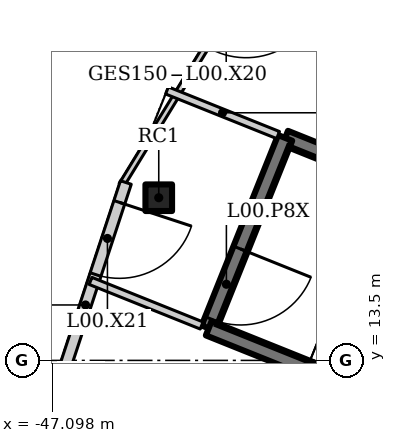
"""IFC4 building model, lengths in metres.
Left out: names, types, materials, properties, quantities, classifications, styles, units other than length and angle.
Written with IfcOpenShell. Run it as: python <this file> out.ifc"""

import sys

from ifc_helpers import new_model, si_unit, direction, frame, frame_2d, origin, origin_2d, place, context, subcontext, project, spatial, rectangle, hollow_rectangle, extrude, element, fill, save


model = new_model("IFC4")
c1 = context("Model", 3, precision=1e-05, world=origin(), true_north=direction((0.0, 1.0)))
c2 = subcontext(c1, "Body", "Model", "MODEL_VIEW")
j1 = project(units=[si_unit("LENGTHUNIT", "METRE"), si_unit("PLANEANGLEUNIT", "RADIAN")], contexts=[c1])
p1 = place(None, origin())
s1 = spatial("IfcSite", under=j1, at=p1, CompositionType="ELEMENT")
p2 = place(p1, origin())
s2 = spatial("IfcBuilding", under=s1, at=p2, CompositionType="ELEMENT")
p3 = place(p2, origin())
s3 = spatial("IfcBuildingStorey", under=s2, at=p3, CompositionType="ELEMENT", Elevation=0.0)
p4 = place(p3, frame((-44.292, 17.781, 0.0), z_axis=(0.0, 0.0, 1.0), x_axis=(1.0, 0.0, 0.0)))
e1 = element("IfcColumn", 1, at=p4, inside=s3, PredefinedType="COLUMN", context=c2, shape_type="SweptSolid", body=[
    extrude(hollow_rectangle(XDim=0.7, YDim=0.7, WallThickness=0.04, at=origin_2d()), origin(), (0.0, 0.0, 1.0), 6.5),
])
p5 = place(p3, frame((-41.734, 23.892, 0.0), z_axis=(0.0, 0.0, 1.0), x_axis=(-0.522237351002, -0.852800181296, 0.0)))
e2 = element("IfcWall", 2, at=p5, inside=s3, PredefinedType="ELEMENTEDWALL", context=c2, shape_type="SweptSolid", body=[
    extrude(rectangle(XDim=6.771, YDim=0.15, at=frame_2d((3.386, 0.0))), origin(), (0.0, 0.0, 1.0), 6.3),
])
p6 = place(p5, frame((0.5, 0.0, 0.0)))
e3 = element("IfcOpeningElement", 3, at=p6, cuts=e2, PredefinedType="OPENING", context=c2, shape_type="SweptSolid", body=[
    extrude(rectangle(XDim=2.0, YDim=2.4, at=frame_2d((1.0, 1.2))), frame((0.0, 0.085, 0.0), z_axis=(0.0, -1.0, 0.0), x_axis=(1.0, 0.0, 0.0)), (0.0, 0.0, 1.0), 0.17),
])
p7 = place(p3, frame((-45.158, 18.182, 0.0), z_axis=(0.0, 0.0, 1.0), x_axis=(-0.31263149373, -0.94987449125, 0.0)))
e4 = element("IfcWall", 4, at=p7, inside=s3, PredefinedType="SOLIDWALL", context=c2, shape_type="SweptSolid", body=[
    extrude(rectangle(XDim=6.786, YDim=0.3, at=frame_2d((3.393, 0.0))), origin(), (0.0, 0.0, 1.0), 6.3),
])
p8 = place(p7, frame((0.55, 0.0, 0.0)))
e5 = element("IfcOpeningElement", 5, at=p8, cuts=e4, PredefinedType="OPENING", context=c2, shape_type="SweptSolid", body=[
    extrude(rectangle(XDim=2.0, YDim=2.1, at=frame_2d((1.0, 1.05))), frame((0.0, 0.16, 0.0), z_axis=(0.0, -1.0, 0.0), x_axis=(1.0, 0.0, 0.0)), (0.0, 0.0, 1.0), 0.32),
])
p9 = place(p3, frame((-41.152, 19.43, 0.0), z_axis=(0.0, 0.0, 1.0), x_axis=(-0.928037743531, 0.372486169652, 0.0)))
e6 = element("IfcWall", 6, at=p9, inside=s3, PredefinedType="SOLIDWALL", context=c2, shape_type="SweptSolid", body=[
    extrude(rectangle(XDim=3.15, YDim=0.2, at=frame_2d((1.575, 0.0))), origin(), (0.0, 0.0, 1.0), 6.3),
])
p10 = place(p3, frame((-43.164, 14.418, 0.0), z_axis=(0.0, 0.0, 1.0), x_axis=(-0.928010950087, 0.372552917744, 0.0)))
e7 = element("IfcWall", 7, at=p10, inside=s3, PredefinedType="SOLIDWALL", context=c2, shape_type="SweptSolid", body=[
    extrude(rectangle(XDim=3.15, YDim=0.2, at=frame_2d((1.575, 0.0))), origin(), (0.0, 0.0, 1.0), 6.3),
])
p11 = place(p3, frame((-32.8, 16.077, 0.0), z_axis=(0.0, 0.0, 1.0), x_axis=(-0.92801678004, 0.372538395288, 0.0)))
e8 = element("IfcWall", 8, at=p11, inside=s3, PredefinedType="SHEAR", context=c2, shape_type="SweptSolid", body=[
    extrude(rectangle(XDim=8.8, YDim=0.4, at=frame_2d((4.4, 0.0))), origin(), (0.0, 0.0, 1.0), 6.5),
])
p12 = place(p3, frame((-40.967, 19.355, 0.0), z_axis=(0.0, 0.0, 1.0), x_axis=(-0.372544066459, -0.928014503414, 0.0)))
e9 = element("IfcWall", 9, at=p12, inside=s3, PredefinedType="SHEAR", context=c2, shape_type="SweptSolid", body=[
    extrude(rectangle(XDim=5.4, YDim=0.4, at=frame_2d((2.7, 0.0))), origin(), (0.0, 0.0, 1.0), 6.5),
])
p13 = place(p12, frame((3.15, 0.0, 0.0)))
e10 = element("IfcOpeningElement", 10, at=p13, cuts=e9, PredefinedType="OPENING", context=c2, shape_type="SweptSolid", body=[
    extrude(rectangle(XDim=2.0, YDim=2.1, at=frame_2d((1.0, 1.05))), frame((0.0, 0.21, 0.0), z_axis=(0.0, -1.0, 0.0), x_axis=(1.0, 0.0, 0.0)), (0.0, 0.0, 1.0), 0.42),
])
p14 = place(p3, frame((-42.978, 14.344, 0.0), z_axis=(0.0, 0.0, 1.0), x_axis=(0.92801678004, -0.372538395288, 0.0)))
e11 = element("IfcWall", 11, at=p14, inside=s3, PredefinedType="SHEAR", context=c2, shape_type="SweptSolid", body=[
    extrude(rectangle(XDim=8.8, YDim=0.4, at=frame_2d((4.4, 0.0))), origin(), (0.0, 0.0, 1.0), 6.5),
])
p15 = place(p8, origin())
e12 = element("IfcDoor", 12, at=p15, inside=s3, OperationType="DOUBLE_DOOR_DOUBLE_SWING", PredefinedType="DOOR", context=c2, shape_type="SweptSolid", body=[
    extrude(rectangle(XDim=2.0, YDim=2.1, at=frame_2d((1.0, 1.05))), frame((0.0, 0.025, 0.0), z_axis=(0.0, -1.0, 0.0), x_axis=(1.0, 0.0, 0.0)), (0.0, 0.0, 1.0), 0.05),
])
fill(e5, e12)
p16 = place(p13, origin())
e13 = element("IfcDoor", 13, at=p16, inside=s3, OperationType="DOUBLE_DOOR_DOUBLE_SWING", PredefinedType="DOOR", context=c2, shape_type="SweptSolid", body=[
    extrude(rectangle(XDim=2.0, YDim=2.1, at=frame_2d((1.0, 1.05))), frame((0.0, 0.025, 0.0), z_axis=(0.0, -1.0, 0.0), x_axis=(1.0, 0.0, 0.0)), (0.0, 0.0, 1.0), 0.05),
])
fill(e10, e13)
save(model, sys.argv[1])
